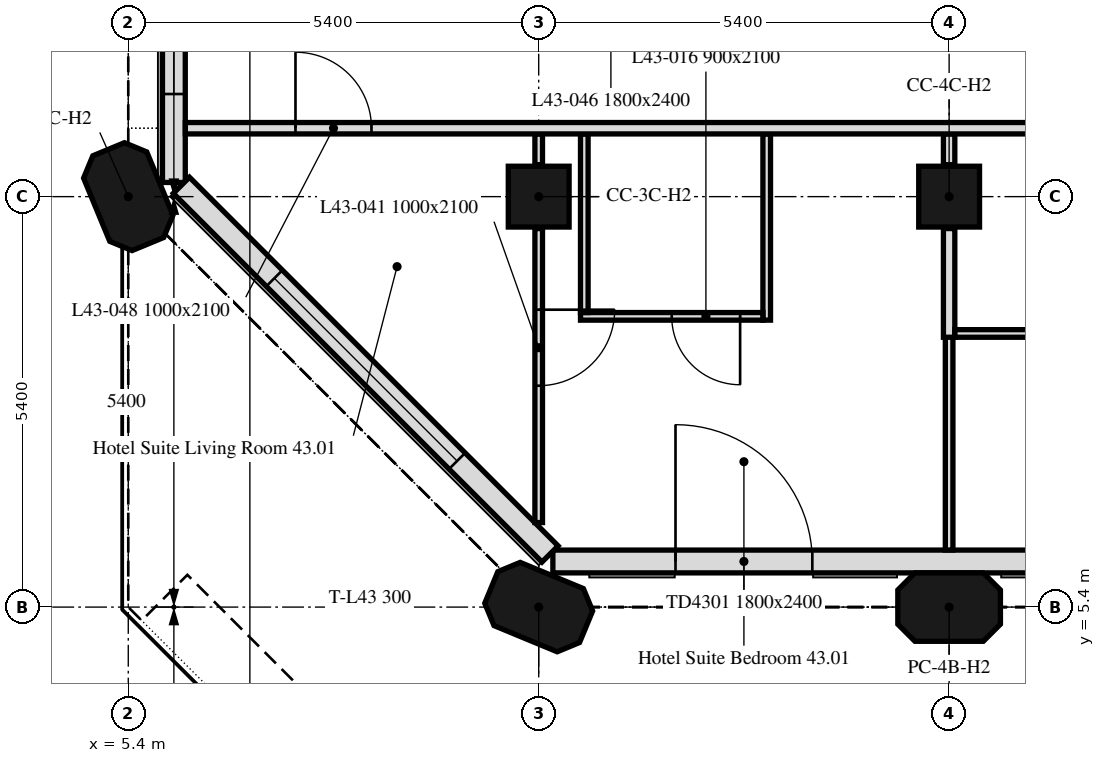
"""IFC4 building model, lengths in metres.
Left out: names, types, materials, properties, quantities, classifications, styles, units other than length and angle.
Written with IfcOpenShell. Run it as: python <this file> out.ifc"""

import sys

from ifc_helpers import new_model, si_unit, direction, frame, frame_2d, origin, origin_2d, place, context, subcontext, project, spatial, polyline, rectangle, outline, extrude, element, fill, save


model = new_model("IFC4")
c1 = context("Model", 3, precision=1e-05, world=origin(), true_north=direction((0.0, 1.0)))
c2 = subcontext(c1, "Body", "Model", "MODEL_VIEW")
j1 = project(units=[si_unit("LENGTHUNIT", "METRE"), si_unit("PLANEANGLEUNIT", "RADIAN")], contexts=[c1])
p1 = place(None, origin())
s1 = spatial("IfcSite", under=j1, at=p1, CompositionType="ELEMENT")
p2 = place(p1, origin())
s2 = spatial("IfcBuilding", under=s1, at=p2, CompositionType="ELEMENT")
p3 = place(p2, frame((0.0, 0.0, 180.7)))
s3 = spatial("IfcBuildingStorey", under=s2, at=p3, CompositionType="ELEMENT", Elevation=180.7)
for number, where, z_axis, x_axis in (
    (1, (10.8, 5.4, 0.0), (0.0, 0.0, 1.0), (-0.924, 0.383, 0.0)),
    (2, (16.2, 5.4, 0.0), (0.0, 0.0, 1.0), (1.0, 0.0, 0.0)),
    (3, (5.4, 10.8, 0.0), (0.0, 0.0, 1.0), (-0.383, 0.924, 0.0)),
):
    element("IfcColumn", number, at=place(p3, frame(where, z_axis=z_axis, x_axis=x_axis)), inside=s3, PredefinedType="COLUMN", context=c2, shape_type="SweptSolid", body=[
        extrude(outline(polyline([(-0.45, -0.45), (0.45, -0.45), (0.675, -0.225), (0.675, 0.225), (0.45, 0.45), (-0.45, 0.45), (-0.675, 0.225), (-0.675, -0.225), (-0.45, -0.45)])), origin(), (0.0, 0.0, 1.0), 3.0),
    ])
for number, where, z_axis, x_axis in (
    (4, (10.8, 10.8, 0.0), (0.0, 0.0, 1.0), (1.0, 0.0, 0.0)),
    (5, (16.2, 10.8, 0.0), (0.0, 0.0, 1.0), (1.0, 0.0, 0.0)),
):
    element("IfcColumn", number, at=place(p3, frame(where, z_axis=z_axis, x_axis=x_axis)), inside=s3, PredefinedType="COLUMN", context=c2, shape_type="SweptSolid", body=[
        extrude(rectangle(XDim=0.8, YDim=0.8, at=origin_2d()), origin(), (0.0, 0.0, 1.0), 3.0),
    ])
p4 = place(p3, frame((10.986, 6.0, 0.0), z_axis=(0.0, 0.0, 1.0), x_axis=(1.0, 0.0, 0.0)))
e6 = element("IfcWall", 6, at=p4, inside=s3, PredefinedType="SOLIDWALL", context=c2, shape_type="SweptSolid", body=[
    extrude(rectangle(XDim=32.027, YDim=0.3, at=frame_2d((16.014, 0.0))), origin(), (0.0, 0.0, 1.0), 3.0),
])
p5 = place(p4, frame((1.614, 0.0, 0.0)))
e7 = element("IfcOpeningElement", 7, at=p5, cuts=e6, PredefinedType="OPENING", context=c2, shape_type="SweptSolid", body=[
    extrude(rectangle(XDim=1.8, YDim=2.4, at=frame_2d((0.9, 1.2))), frame((0.0, 0.16, 0.0), z_axis=(0.0, -1.0, 0.0), x_axis=(1.0, 0.0, 0.0)), (0.0, 0.0, 1.0), 0.32),
])
p6 = place(p4, frame((12.414, 0.0, 0.0)))
e8 = element("IfcOpeningElement", 8, at=p6, cuts=e6, PredefinedType="OPENING", context=c2, shape_type="SweptSolid", body=[
    extrude(rectangle(XDim=1.8, YDim=2.4, at=frame_2d((0.9, 1.2))), frame((0.0, 0.16, 0.0), z_axis=(0.0, -1.0, 0.0), x_axis=(1.0, 0.0, 0.0)), (0.0, 0.0, 1.0), 0.32),
])
p7 = place(p4, frame((23.214, 0.0, 0.0)))
e9 = element("IfcOpeningElement", 9, at=p7, cuts=e6, PredefinedType="OPENING", context=c2, shape_type="SweptSolid", body=[
    extrude(rectangle(XDim=1.8, YDim=2.4, at=frame_2d((0.9, 1.2))), frame((0.0, 0.16, 0.0), z_axis=(0.0, -1.0, 0.0), x_axis=(1.0, 0.0, 0.0)), (0.0, 0.0, 1.0), 0.32),
])
p8 = place(p4, frame((28.614, 0.0, 0.0)))
e10 = element("IfcOpeningElement", 10, at=p8, cuts=e6, PredefinedType="OPENING", context=c2, shape_type="SweptSolid", body=[
    extrude(rectangle(XDim=1.8, YDim=2.4, at=frame_2d((0.9, 1.2))), frame((0.0, 0.16, 0.0), z_axis=(0.0, -1.0, 0.0), x_axis=(1.0, 0.0, 0.0)), (0.0, 0.0, 1.0), 0.32),
])
p9 = place(p4, frame((7.464, 0.0, 0.9)))
e11 = element("IfcOpeningElement", 11, at=p9, cuts=e6, PredefinedType="OPENING", context=c2, shape_type="SweptSolid", body=[
    extrude(rectangle(XDim=1.1, YDim=1.7, at=frame_2d((0.55, 0.85))), frame((0.0, 0.16, 0.0), z_axis=(0.0, -1.0, 0.0), x_axis=(1.0, 0.0, 0.0)), (0.0, 0.0, 1.0), 0.32),
])
p10 = place(p4, frame((18.264, 0.0, 0.9)))
e12 = element("IfcOpeningElement", 12, at=p10, cuts=e6, PredefinedType="OPENING", context=c2, shape_type="SweptSolid", body=[
    extrude(rectangle(XDim=1.1, YDim=1.7, at=frame_2d((0.55, 0.85))), frame((0.0, 0.16, 0.0), z_axis=(0.0, -1.0, 0.0), x_axis=(1.0, 0.0, 0.0)), (0.0, 0.0, 1.0), 0.32),
])
p11 = place(p3, frame((6.0, 16.2, 0.0), z_axis=(0.0, 0.0, 1.0), x_axis=(0.0, -1.0, 0.0)))
e13 = element("IfcWall", 13, at=p11, inside=s3, PredefinedType="SOLIDWALL", context=c2, shape_type="SweptSolid", body=[
    extrude(rectangle(XDim=5.214, YDim=0.3, at=frame_2d((2.607, 0.0))), origin(), (0.0, 0.0, 1.0), 3.0),
])
p12 = place(p11, frame((1.35, 0.0, 0.9)))
e14 = element("IfcOpeningElement", 14, at=p12, cuts=e13, PredefinedType="OPENING", context=c2, shape_type="SweptSolid", body=[
    extrude(rectangle(XDim=1.1, YDim=1.7, at=frame_2d((0.55, 0.85))), frame((0.0, 0.16, 0.0), z_axis=(0.0, -1.0, 0.0), x_axis=(1.0, 0.0, 0.0)), (0.0, 0.0, 1.0), 0.32),
])
p13 = place(p11, frame((2.95, 0.0, 0.9)))
e15 = element("IfcOpeningElement", 15, at=p13, cuts=e13, PredefinedType="OPENING", context=c2, shape_type="SweptSolid", body=[
    extrude(rectangle(XDim=1.1, YDim=1.7, at=frame_2d((0.55, 0.85))), frame((0.0, 0.16, 0.0), z_axis=(0.0, -1.0, 0.0), x_axis=(1.0, 0.0, 0.0)), (0.0, 0.0, 1.0), 0.32),
])
p14 = place(p3, frame((6.099, 10.949, 0.0), z_axis=(0.0, 0.0, 1.0), x_axis=(0.707106781187, -0.707106781187, 0.0)))
e16 = element("IfcWall", 16, at=p14, inside=s3, PredefinedType="SOLIDWALL", context=c2, shape_type="SweptSolid", body=[
    extrude(rectangle(XDim=6.86, YDim=0.3, at=frame_2d((3.43, 0.0))), origin(), (0.0, 0.0, 1.0), 3.0),
])
p15 = place(p14, frame((1.73, 0.0, 0.9)))
e17 = element("IfcOpeningElement", 17, at=p15, cuts=e16, PredefinedType="OPENING", context=c2, shape_type="SweptSolid", body=[
    extrude(rectangle(XDim=3.4, YDim=1.7, at=frame_2d((1.7, 0.85))), frame((0.0, 0.16, 0.0), z_axis=(0.0, -1.0, 0.0), x_axis=(1.0, 0.0, 0.0)), (0.0, 0.0, 1.0), 0.32),
])
p16 = place(p3, frame((16.2, 6.151, 0.0), z_axis=(0.0, 0.0, 1.0), x_axis=(0.0, 1.0, 0.0)))
e18 = element("IfcWall", 18, at=p16, inside=s3, PredefinedType="PARTITIONING", context=c2, shape_type="SweptSolid", body=[
    extrude(rectangle(XDim=2.899, YDim=0.1, at=frame_2d((1.45, 0.0))), origin(), (0.0, 0.0, 1.0), 3.0),
])
p17 = place(p3, frame((16.2, 8.95, 0.0), z_axis=(0.0, 0.0, 1.0), x_axis=(0.0, 1.0, 0.0)))
e19 = element("IfcWall", 19, at=p17, inside=s3, PredefinedType="PARTITIONING", context=c2, shape_type="SweptSolid", body=[
    extrude(rectangle(XDim=1.43, YDim=0.15, at=frame_2d((0.715, 0.0))), origin(), (0.0, 0.0, 1.0), 3.0),
])
p18 = place(p3, frame((16.2, 11.22, 0.0), z_axis=(0.0, 0.0, 1.0), x_axis=(0.0, 1.0, 0.0)))
e20 = element("IfcWall", 20, at=p18, inside=s3, PredefinedType="PARTITIONING", context=c2, shape_type="SweptSolid", body=[
    extrude(rectangle(XDim=0.405, YDim=0.15, at=frame_2d((0.203, 0.0))), origin(), (0.0, 0.0, 1.0), 3.0),
])
p19 = place(p3, frame((13.8, 11.625, 0.0), z_axis=(0.0, 0.0, 1.0), x_axis=(0.0, -1.0, 0.0)))
e21 = element("IfcWall", 21, at=p19, inside=s3, PredefinedType="PARTITIONING", context=c2, shape_type="SweptSolid", body=[
    extrude(rectangle(XDim=2.45, YDim=0.1, at=frame_2d((1.225, 0.0))), origin(), (0.0, 0.0, 1.0), 3.0),
])
p20 = place(p3, frame((13.75, 9.225, 0.0), z_axis=(0.0, 0.0, 1.0), x_axis=(-1.0, 0.0, 0.0)))
e22 = element("IfcWall", 22, at=p20, inside=s3, PredefinedType="PARTITIONING", context=c2, shape_type="SweptSolid", body=[
    extrude(rectangle(XDim=2.4, YDim=0.1, at=frame_2d((1.2, 0.0))), origin(), (0.0, 0.0, 1.0), 3.0),
])
p21 = place(p20, frame((0.3, 0.0, 0.0)))
e23 = element("IfcOpeningElement", 23, at=p21, cuts=e22, PredefinedType="OPENING", context=c2, shape_type="SweptSolid", body=[
    extrude(rectangle(XDim=0.9, YDim=2.1, at=frame_2d((0.45, 1.05))), frame((0.0, 0.05, 0.0), z_axis=(0.0, -1.0, 0.0), x_axis=(1.0, 0.0, 0.0)), (0.0, 0.0, 1.0), 0.1),
])
p22 = place(p3, frame((11.4, 9.275, 0.0), z_axis=(0.0, 0.0, 1.0), x_axis=(0.0, 1.0, 0.0)))
e24 = element("IfcWall", 24, at=p22, inside=s3, PredefinedType="PARTITIONING", context=c2, shape_type="SweptSolid", body=[
    extrude(rectangle(XDim=2.35, YDim=0.1, at=frame_2d((1.175, 0.0))), origin(), (0.0, 0.0, 1.0), 3.0),
])
p23 = place(p3, frame((10.8, 11.625, 0.0), z_axis=(0.0, 0.0, 1.0), x_axis=(0.0, -1.0, 0.0)))
e25 = element("IfcWall", 25, at=p23, inside=s3, PredefinedType="PARTITIONING", context=c2, shape_type="SweptSolid", body=[
    extrude(rectangle(XDim=0.405, YDim=0.1, at=frame_2d((0.203, 0.0))), origin(), (0.0, 0.0, 1.0), 3.0),
])
p24 = place(p3, frame((10.8, 10.38, 0.0), z_axis=(0.0, 0.0, 1.0), x_axis=(0.0, -1.0, 0.0)))
e26 = element("IfcWall", 26, at=p24, inside=s3, PredefinedType="PARTITIONING", context=c2, shape_type="SweptSolid", body=[
    extrude(rectangle(XDim=3.868, YDim=0.1, at=frame_2d((1.934, 0.0))), origin(), (0.0, 0.0, 1.0), 3.0),
])
p25 = place(p24, frame((1.067, 0.0, 0.0)))
e27 = element("IfcOpeningElement", 27, at=p25, cuts=e26, PredefinedType="OPENING", context=c2, shape_type="SweptSolid", body=[
    extrude(rectangle(XDim=1.0, YDim=2.1, at=frame_2d((0.5, 1.05))), frame((0.0, 0.05, 0.0), z_axis=(0.0, -1.0, 0.0), x_axis=(1.0, 0.0, 0.0)), (0.0, 0.0, 1.0), 0.1),
])
p26 = place(p3, frame((16.275, 9.0, 0.0), z_axis=(0.0, 0.0, 1.0), x_axis=(1.0, 0.0, 0.0)))
e28 = element("IfcWall", 28, at=p26, inside=s3, PredefinedType="PARTITIONING", context=c2, shape_type="SweptSolid", body=[
    extrude(rectangle(XDim=4.375, YDim=0.1, at=frame_2d((2.188, 0.0))), origin(), (0.0, 0.0, 1.0), 3.0),
])
p27 = place(p26, frame((2.375, 0.0, 0.0)))
e29 = element("IfcOpeningElement", 29, at=p27, cuts=e28, PredefinedType="OPENING", context=c2, shape_type="SweptSolid", body=[
    extrude(rectangle(XDim=0.9, YDim=2.1, at=frame_2d((0.45, 1.05))), frame((0.0, 0.05, 0.0), z_axis=(0.0, -1.0, 0.0), x_axis=(1.0, 0.0, 0.0)), (0.0, 0.0, 1.0), 0.1),
])
p28 = place(p3, frame((6.151, 11.7, 0.0), z_axis=(0.0, 0.0, 1.0), x_axis=(1.0, 0.0, 0.0)))
e30 = element("IfcWall", 30, at=p28, inside=s3, PredefinedType="PARTITIONING", context=c2, shape_type="SweptSolid", body=[
    extrude(rectangle(XDim=41.698, YDim=0.15, at=frame_2d((20.849, 0.0))), origin(), (0.0, 0.0, 1.0), 3.0),
])
p29 = place(p28, frame((1.449, 0.0, 0.0)))
e31 = element("IfcOpeningElement", 31, at=p29, cuts=e30, PredefinedType="OPENING", context=c2, shape_type="SweptSolid", body=[
    extrude(rectangle(XDim=1.0, YDim=2.1, at=frame_2d((0.5, 1.05))), frame((0.0, 0.075, 0.0), z_axis=(0.0, -1.0, 0.0), x_axis=(1.0, 0.0, 0.0)), (0.0, 0.0, 1.0), 0.15),
])
p30 = place(p28, frame((37.954, 0.0, 0.0)))
e32 = element("IfcOpeningElement", 32, at=p30, cuts=e30, PredefinedType="OPENING", context=c2, shape_type="SweptSolid", body=[
    extrude(rectangle(XDim=1.0, YDim=2.1, at=frame_2d((0.5, 1.05))), frame((0.0, 0.075, 0.0), z_axis=(0.0, -1.0, 0.0), x_axis=(1.0, 0.0, 0.0)), (0.0, 0.0, 1.0), 0.15),
])
p31 = place(p28, frame((12.449, 0.0, 0.0)))
e33 = element("IfcOpeningElement", 33, at=p31, cuts=e30, PredefinedType="OPENING", context=c2, shape_type="SweptSolid", body=[
    extrude(rectangle(XDim=1.0, YDim=2.1, at=frame_2d((0.5, 1.05))), frame((0.0, 0.075, 0.0), z_axis=(0.0, -1.0, 0.0), x_axis=(1.0, 0.0, 0.0)), (0.0, 0.0, 1.0), 0.15),
])
p32 = place(p28, frame((23.249, 0.0, 0.0)))
e34 = element("IfcOpeningElement", 34, at=p32, cuts=e30, PredefinedType="OPENING", context=c2, shape_type="SweptSolid", body=[
    extrude(rectangle(XDim=1.0, YDim=2.1, at=frame_2d((0.5, 1.05))), frame((0.0, 0.075, 0.0), z_axis=(0.0, -1.0, 0.0), x_axis=(1.0, 0.0, 0.0)), (0.0, 0.0, 1.0), 0.15),
])
p33 = place(p5, origin())
e35 = element("IfcDoor", 35, at=p33, inside=s3, OperationType="DOUBLE_DOOR_DOUBLE_SWING", PredefinedType="DOOR", context=c2, shape_type="SweptSolid", body=[
    extrude(rectangle(XDim=1.8, YDim=2.4, at=frame_2d((0.9, 1.2))), frame((0.0, 0.025, 0.0), z_axis=(0.0, -1.0, 0.0), x_axis=(1.0, 0.0, 0.0)), (0.0, 0.0, 1.0), 0.05),
])
fill(e7, e35)
p34 = place(p13, origin())
e36 = element("IfcWindow", 36, at=p34, inside=s3, PartitioningType="SINGLE_PANEL", PredefinedType="WINDOW", context=c2, shape_type="SweptSolid", body=[
    extrude(rectangle(XDim=1.1, YDim=1.7, at=frame_2d((0.55, 0.85))), frame((0.0, 0.03, 0.0), z_axis=(0.0, -1.0, 0.0), x_axis=(1.0, 0.0, 0.0)), (0.0, 0.0, 1.0), 0.06),
])
fill(e15, e36)
p35 = place(p15, origin())
e37 = element("IfcWindow", 37, at=p35, inside=s3, PartitioningType="SINGLE_PANEL", PredefinedType="WINDOW", context=c2, shape_type="SweptSolid", body=[
    extrude(rectangle(XDim=3.4, YDim=1.7, at=frame_2d((1.7, 0.85))), frame((0.0, 0.03, 0.0), z_axis=(0.0, -1.0, 0.0), x_axis=(1.0, 0.0, 0.0)), (0.0, 0.0, 1.0), 0.06),
])
fill(e17, e37)
p36 = place(p21, origin())
e38 = element("IfcDoor", 38, at=p36, inside=s3, OperationType="SINGLE_SWING_LEFT", PredefinedType="DOOR", context=c2, shape_type="SweptSolid", body=[
    extrude(rectangle(XDim=0.9, YDim=2.1, at=frame_2d((0.45, 1.05))), frame((0.0, 0.025, 0.0), z_axis=(0.0, -1.0, 0.0), x_axis=(1.0, 0.0, 0.0)), (0.0, 0.0, 1.0), 0.05),
])
fill(e23, e38)
p37 = place(p25, origin())
e39 = element("IfcDoor", 39, at=p37, inside=s3, OperationType="SINGLE_SWING_LEFT", PredefinedType="DOOR", context=c2, shape_type="SweptSolid", body=[
    extrude(rectangle(XDim=1.0, YDim=2.1, at=frame_2d((0.5, 1.05))), frame((0.0, 0.025, 0.0), z_axis=(0.0, -1.0, 0.0), x_axis=(1.0, 0.0, 0.0)), (0.0, 0.0, 1.0), 0.05),
])
fill(e27, e39)
p38 = place(p29, origin())
e40 = element("IfcDoor", 40, at=p38, inside=s3, OperationType="SINGLE_SWING_RIGHT", PredefinedType="DOOR", context=c2, shape_type="SweptSolid", body=[
    extrude(rectangle(XDim=1.0, YDim=2.1, at=frame_2d((0.5, 1.05))), frame((0.0, 0.025, 0.0), z_axis=(0.0, -1.0, 0.0), x_axis=(1.0, 0.0, 0.0)), (0.0, 0.0, 1.0), 0.05),
])
fill(e31, e40)
save(model, sys.argv[1])
